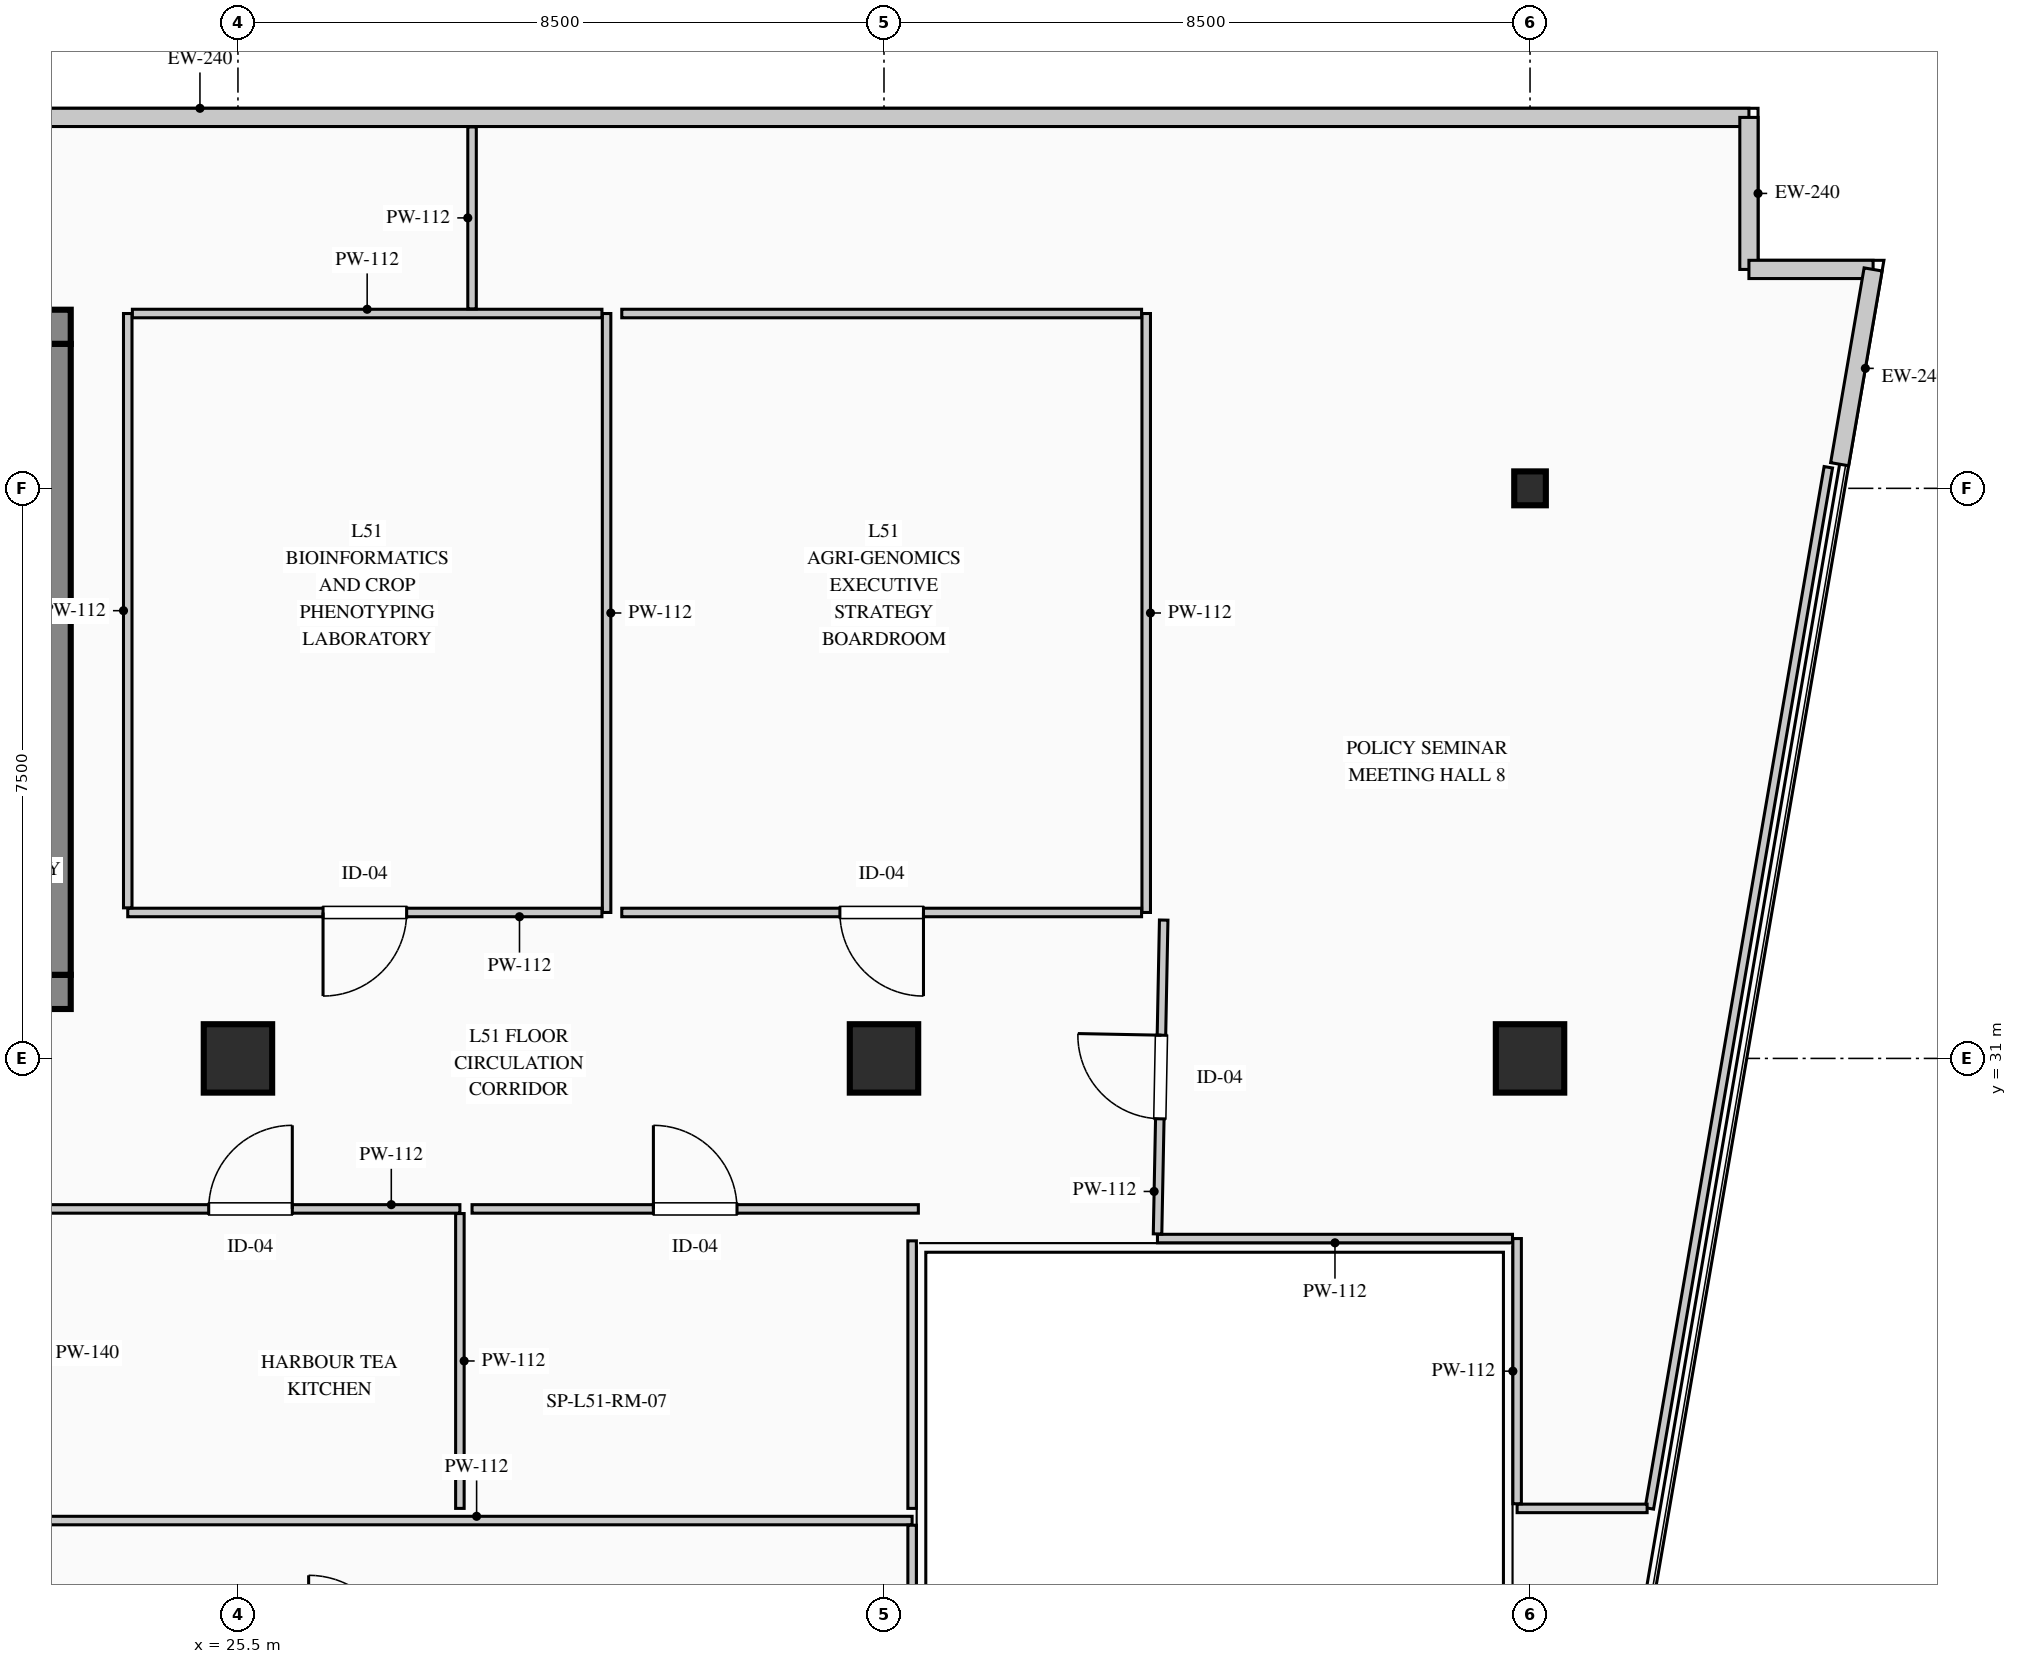
"""IFC4 building model, lengths in metres.
Left out: names, types, materials, properties, quantities, classifications, styles, units other than length and angle.
Written with IfcOpenShell. Run it as: python <this file> out.ifc"""

import sys

from ifc_helpers import new_model, si_unit, direction, frame, frame_2d, origin, origin_2d, place, context, subcontext, project, spatial, rectangle, i_section, extrude, element, fill, save


model = new_model("IFC4")
c1 = context("Model", 3, precision=1e-05, world=origin(), true_north=direction((0.0, 1.0)))
c2 = subcontext(c1, "Body", "Model", "MODEL_VIEW")
j1 = project(units=[si_unit("LENGTHUNIT", "METRE"), si_unit("PLANEANGLEUNIT", "RADIAN")], contexts=[c1])
p1 = place(None, origin())
s1 = spatial("IfcSite", under=j1, at=p1, CompositionType="ELEMENT")
p2 = place(p1, origin())
s2 = spatial("IfcBuilding", under=s1, at=p2, CompositionType="ELEMENT")
p3 = place(p2, frame((0.0, 0.0, 215.35)))
s3 = spatial("IfcBuildingStorey", under=s2, at=p3, CompositionType="ELEMENT", Elevation=215.35)
p4 = place(p3, frame((5.55, 40.625, 0.0), z_axis=(0.0, 0.0, 1.0), x_axis=(1.0, 0.0, 0.0)))
e1 = element("IfcWall", 1, at=p4, inside=s3, PredefinedType="SHEAR", context=c2, shape_type="SweptSolid", body=[
    extrude(rectangle(XDim=17.75, YDim=0.45, at=frame_2d((8.875, 0.0))), origin(), (0.0, 0.0, 1.0), 3.95),
])
p5 = place(p4, frame((15.895, 0.0, 0.0)))
e2 = element("IfcOpeningElement", 2, at=p5, cuts=e1, PredefinedType="OPENING", context=c2, shape_type="SweptSolid", body=[
    extrude(rectangle(XDim=1.18, YDim=2.25, at=frame_2d((0.59, 1.125))), frame((0.0, 0.235, 0.0), z_axis=(0.0, -1.0, 0.0), x_axis=(1.0, 0.0, 0.0)), (0.0, 0.0, 1.0), 0.47),
])
p6 = place(p3, frame((5.55, 31.875, 0.0), z_axis=(0.0, 0.0, 1.0), x_axis=(1.0, 0.0, 0.0)))
e3 = element("IfcWall", 3, at=p6, inside=s3, PredefinedType="SHEAR", context=c2, shape_type="SweptSolid", body=[
    extrude(rectangle(XDim=17.75, YDim=0.45, at=frame_2d((8.875, 0.0))), origin(), (0.0, 0.0, 1.0), 3.95),
])
p7 = place(p6, frame((3.1, 0.0, 0.0)))
e4 = element("IfcOpeningElement", 4, at=p7, cuts=e3, PredefinedType="OPENING", context=c2, shape_type="SweptSolid", body=[
    extrude(rectangle(XDim=1.2, YDim=2.2, at=frame_2d((0.6, 1.1))), frame((0.0, 0.235, 0.0), z_axis=(0.0, -1.0, 0.0), x_axis=(1.0, 0.0, 0.0)), (0.0, 0.0, 1.0), 0.47),
])
p8 = place(p6, frame((6.95, 0.0, 0.0)))
e5 = element("IfcOpeningElement", 5, at=p8, cuts=e3, PredefinedType="OPENING", context=c2, shape_type="SweptSolid", body=[
    extrude(rectangle(XDim=1.2, YDim=2.2, at=frame_2d((0.6, 1.1))), frame((0.0, 0.235, 0.0), z_axis=(0.0, -1.0, 0.0), x_axis=(1.0, 0.0, 0.0)), (0.0, 0.0, 1.0), 0.47),
])
p9 = place(p6, frame((8.8, 0.0, 0.0)))
e6 = element("IfcOpeningElement", 6, at=p9, cuts=e3, PredefinedType="OPENING", context=c2, shape_type="SweptSolid", body=[
    extrude(rectangle(XDim=1.15, YDim=2.2, at=frame_2d((0.575, 1.1))), frame((0.0, 0.235, 0.0), z_axis=(0.0, -1.0, 0.0), x_axis=(1.0, 0.0, 0.0)), (0.0, 0.0, 1.0), 0.47),
])
p10 = place(p6, frame((15.9, 0.0, 0.0)))
e7 = element("IfcOpeningElement", 7, at=p10, cuts=e3, PredefinedType="OPENING", context=c2, shape_type="SweptSolid", body=[
    extrude(rectangle(XDim=1.2, YDim=2.2, at=frame_2d((0.6, 1.1))), frame((0.0, 0.235, 0.0), z_axis=(0.0, -1.0, 0.0), x_axis=(1.0, 0.0, 0.0)), (0.0, 0.0, 1.0), 0.47),
])
p11 = place(p3, frame((23.075, 32.1, 0.0), z_axis=(0.0, 0.0, 1.0), x_axis=(0.0, 1.0, 0.0)))
e8 = element("IfcWall", 8, at=p11, inside=s3, PredefinedType="SHEAR", context=c2, shape_type="SweptSolid", body=[
    extrude(rectangle(XDim=8.3, YDim=0.45, at=frame_2d((4.15, 0.0))), origin(), (0.0, 0.0, 1.0), 3.95),
])
for number, where, z_axis, x_axis in (
    (9, (25.5, 31.0, 0.0), (0.0, 0.0, 1.0), (1.0, 0.0, 0.0)),
    (10, (34.0, 31.0, 0.0), (0.0, 0.0, 1.0), (1.0, 0.0, 0.0)),
    (11, (42.5, 31.0, 0.0), (0.0, 0.0, 1.0), (1.0, 0.0, 0.0)),
):
    element("IfcColumn", number, at=place(p3, frame(where, z_axis=z_axis, x_axis=x_axis)), inside=s3, PredefinedType="COLUMN", context=c2, shape_type="SweptSolid", body=[
        extrude(rectangle(XDim=0.9, YDim=0.9, at=origin_2d()), origin(), (0.0, 0.0, 1.0), 3.95),
    ])
p12 = place(p3, frame((42.5, 38.5, 0.0), z_axis=(0.0, 0.0, 1.0), x_axis=(1.0, 0.0, 0.0)))
e12 = element("IfcColumn", 12, at=p12, inside=s3, PredefinedType="COLUMN", context=c2, shape_type="SweptSolid", body=[
    extrude(i_section(OverallWidth=0.416, OverallDepth=0.446, WebThickness=0.039, FlangeThickness=0.063, FilletRadius=0.015, at=origin_2d()), origin(), (0.0, 0.0, 1.0), 3.95),
])
p13 = place(p3, frame((4.62, 43.38, 0.0), z_axis=(0.0, 0.0, 1.0), x_axis=(1.0, 0.0, 0.0)))
e13 = element("IfcWall", 13, at=p13, inside=s3, PredefinedType="STANDARD", context=c2, shape_type="SweptSolid", body=[
    extrude(rectangle(XDim=40.76, YDim=0.24, at=frame_2d((20.38, 0.0))), origin(), (0.0, 0.0, 1.0), 3.7),
])
p14 = place(p13, frame((13.324, 0.0, 0.9)))
e14 = element("IfcOpeningElement", 14, at=p14, cuts=e13, PredefinedType="OPENING", context=c2, shape_type="SweptSolid", body=[
    extrude(rectangle(XDim=2.7, YDim=2.1, at=frame_2d((1.35, 1.05))), frame((0.0, 0.13, 0.0), z_axis=(0.0, -1.0, 0.0), x_axis=(1.0, 0.0, 0.0)), (0.0, 0.0, 1.0), 0.26),
])
p15 = place(p3, frame((45.38, 43.38, 0.0), z_axis=(0.0, 0.0, 1.0), x_axis=(0.0, -1.0, 0.0)))
e15 = element("IfcWall", 15, at=p15, inside=s3, PredefinedType="STANDARD", context=c2, shape_type="SweptSolid", body=[
    extrude(rectangle(XDim=2.0, YDim=0.24, at=frame_2d((1.0, 0.0))), origin(), (0.0, 0.0, 1.0), 3.7),
])
p16 = place(p3, frame((45.38, 41.38, 0.0), z_axis=(0.0, 0.0, 1.0), x_axis=(1.0, 0.0, 0.0)))
e16 = element("IfcWall", 16, at=p16, inside=s3, PredefinedType="STANDARD", context=c2, shape_type="SweptSolid", body=[
    extrude(rectangle(XDim=1.634, YDim=0.24, at=frame_2d((0.817, 0.0))), origin(), (0.0, 0.0, 1.0), 3.7),
])
p17 = place(p3, frame((47.014, 41.38, 0.0), z_axis=(0.0, 0.0, 1.0), x_axis=(-0.169406892601, -0.985546196147, 0.0)))
e17 = element("IfcWall", 17, at=p17, inside=s3, PredefinedType="STANDARD", context=c2, shape_type="SweptSolid", body=[
    extrude(rectangle(XDim=2.6, YDim=0.24, at=frame_2d((1.3, 0.0))), origin(), (0.0, 0.0, 1.0), 3.7),
])
p18 = place(p3, frame((30.35, 40.8, 0.0), z_axis=(0.0, 0.0, 1.0), x_axis=(0.0, -1.0, 0.0)))
e18 = element("IfcWall", 18, at=p18, inside=s3, PredefinedType="PARTITIONING", context=c2, shape_type="SweptSolid", body=[
    extrude(rectangle(XDim=7.88, YDim=0.112, at=frame_2d((3.94, 0.0))), origin(), (0.0, 0.0, 1.0), 3.7),
])
p19 = place(p3, frame((30.289, 32.92, 0.0), z_axis=(0.0, 0.0, 1.0), x_axis=(-1.0, 0.0, 0.0)))
e19 = element("IfcWall", 19, at=p19, inside=s3, PredefinedType="PARTITIONING", context=c2, shape_type="SweptSolid", body=[
    extrude(rectangle(XDim=6.239, YDim=0.112, at=frame_2d((3.12, 0.0))), origin(), (0.0, 0.0, 1.0), 3.7),
])
p20 = place(p19, frame((2.57, 0.0, 0.0)))
e20 = element("IfcOpeningElement", 20, at=p20, cuts=e19, PredefinedType="OPENING", context=c2, shape_type="SweptSolid", body=[
    extrude(rectangle(XDim=1.1, YDim=2.2, at=frame_2d((0.55, 1.1))), frame((0.0, 0.066, 0.0), z_axis=(0.0, -1.0, 0.0), x_axis=(1.0, 0.0, 0.0)), (0.0, 0.0, 1.0), 0.132),
])
p21 = place(p3, frame((24.05, 32.981, 0.0), z_axis=(0.0, 0.0, 1.0), x_axis=(0.0, 1.0, 0.0)))
e21 = element("IfcWall", 21, at=p21, inside=s3, PredefinedType="PARTITIONING", context=c2, shape_type="SweptSolid", body=[
    extrude(rectangle(XDim=7.819, YDim=0.112, at=frame_2d((3.91, 0.0))), origin(), (0.0, 0.0, 1.0), 3.7),
])
p22 = place(p3, frame((24.111, 40.8, 0.0), z_axis=(0.0, 0.0, 1.0), x_axis=(1.0, 0.0, 0.0)))
e22 = element("IfcWall", 22, at=p22, inside=s3, PredefinedType="PARTITIONING", context=c2, shape_type="SweptSolid", body=[
    extrude(rectangle(XDim=6.178, YDim=0.112, at=frame_2d((3.089, 0.0))), origin(), (0.0, 0.0, 1.0), 3.7),
])
p23 = place(p3, frame((37.45, 40.8, 0.0), z_axis=(0.0, 0.0, 1.0), x_axis=(0.0, -1.0, 0.0)))
e23 = element("IfcWall", 23, at=p23, inside=s3, PredefinedType="PARTITIONING", context=c2, shape_type="SweptSolid", body=[
    extrude(rectangle(XDim=7.88, YDim=0.112, at=frame_2d((3.94, 0.0))), origin(), (0.0, 0.0, 1.0), 3.7),
])
p24 = place(p3, frame((37.389, 32.92, 0.0), z_axis=(0.0, 0.0, 1.0), x_axis=(-1.0, 0.0, 0.0)))
e24 = element("IfcWall", 24, at=p24, inside=s3, PredefinedType="PARTITIONING", context=c2, shape_type="SweptSolid", body=[
    extrude(rectangle(XDim=6.839, YDim=0.112, at=frame_2d((3.419, 0.0))), origin(), (0.0, 0.0, 1.0), 3.7),
])
p25 = place(p24, frame((2.869, 0.0, 0.0)))
e25 = element("IfcOpeningElement", 25, at=p25, cuts=e24, PredefinedType="OPENING", context=c2, shape_type="SweptSolid", body=[
    extrude(rectangle(XDim=1.1, YDim=2.2, at=frame_2d((0.55, 1.1))), frame((0.0, 0.066, 0.0), z_axis=(0.0, -1.0, 0.0), x_axis=(1.0, 0.0, 0.0)), (0.0, 0.0, 1.0), 0.132),
])
p26 = place(p3, frame((30.55, 40.8, 0.0), z_axis=(0.0, 0.0, 1.0), x_axis=(1.0, 0.0, 0.0)))
e26 = element("IfcWall", 26, at=p26, inside=s3, PredefinedType="PARTITIONING", context=c2, shape_type="SweptSolid", body=[
    extrude(rectangle(XDim=6.839, YDim=0.112, at=frame_2d((3.419, 0.0))), origin(), (0.0, 0.0, 1.0), 3.7),
])
p27 = place(p3, frame((22.91, 24.92, 0.0), z_axis=(0.0, 0.0, 1.0), x_axis=(1.0, 0.0, 0.0)))
e27 = element("IfcWall", 27, at=p27, inside=s3, PredefinedType="PARTITIONING", context=c2, shape_type="SweptSolid", body=[
    extrude(rectangle(XDim=11.46, YDim=0.112, at=frame_2d((5.73, 0.0))), origin(), (0.0, 0.0, 1.0), 3.325),
])
p28 = place(p3, frame((34.37, 24.859, 0.0), z_axis=(0.0, 0.0, 1.0), x_axis=(0.0, -1.0, 0.0)))
e28 = element("IfcWall", 28, at=p28, inside=s3, PredefinedType="PARTITIONING", context=c2, shape_type="SweptSolid", body=[
    extrude(rectangle(XDim=5.239, YDim=0.112, at=frame_2d((2.619, 0.0))), origin(), (0.0, 0.0, 1.0), 3.7),
])
p29 = place(p3, frame((22.91, 29.02, 0.0), z_axis=(0.0, 0.0, 1.0), x_axis=(1.0, 0.0, 0.0)))
e29 = element("IfcWall", 29, at=p29, inside=s3, PredefinedType="PARTITIONING", context=c2, shape_type="SweptSolid", body=[
    extrude(rectangle(XDim=5.51, YDim=0.112, at=frame_2d((2.755, 0.0))), origin(), (0.0, 0.0, 1.0), 3.485),
])
p30 = place(p29, frame((2.205, 0.0, 0.0)))
e30 = element("IfcOpeningElement", 30, at=p30, cuts=e29, PredefinedType="OPENING", context=c2, shape_type="SweptSolid", body=[
    extrude(rectangle(XDim=1.1, YDim=2.2, at=frame_2d((0.55, 1.1))), frame((0.0, 0.066, 0.0), z_axis=(0.0, -1.0, 0.0), x_axis=(1.0, 0.0, 0.0)), (0.0, 0.0, 1.0), 0.132),
])
p31 = place(p3, frame((28.42, 28.959, 0.0), z_axis=(0.0, 0.0, 1.0), x_axis=(0.0, -1.0, 0.0)))
e31 = element("IfcWall", 31, at=p31, inside=s3, PredefinedType="PARTITIONING", context=c2, shape_type="SweptSolid", body=[
    extrude(rectangle(XDim=3.879, YDim=0.112, at=frame_2d((1.939, 0.0))), origin(), (0.0, 0.0, 1.0), 3.7),
])
p32 = place(p3, frame((34.37, 28.6, 0.0), z_axis=(0.0, 0.0, 1.0), x_axis=(0.0, -1.0, 0.0)))
e32 = element("IfcWall", 32, at=p32, inside=s3, PredefinedType="PARTITIONING", context=c2, shape_type="SweptSolid", body=[
    extrude(rectangle(XDim=3.52, YDim=0.112, at=frame_2d((1.76, 0.0))), origin(), (0.0, 0.0, 1.0), 3.7),
])
p33 = place(p3, frame((28.58, 29.02, 0.0), z_axis=(0.0, 0.0, 1.0), x_axis=(1.0, 0.0, 0.0)))
e33 = element("IfcWall", 33, at=p33, inside=s3, PredefinedType="PARTITIONING", context=c2, shape_type="SweptSolid", body=[
    extrude(rectangle(XDim=5.872, YDim=0.112, at=frame_2d((2.936, 0.0))), origin(), (0.0, 0.0, 1.0), 3.485),
])
p34 = place(p33, frame((2.386, 0.0, 0.0)))
e34 = element("IfcOpeningElement", 34, at=p34, cuts=e33, PredefinedType="OPENING", context=c2, shape_type="SweptSolid", body=[
    extrude(rectangle(XDim=1.1, YDim=2.2, at=frame_2d((0.55, 1.1))), frame((0.0, 0.066, 0.0), z_axis=(0.0, -1.0, 0.0), x_axis=(1.0, 0.0, 0.0)), (0.0, 0.0, 1.0), 0.132),
])
p35 = place(p3, frame((46.425, 38.777, 0.0), z_axis=(0.0, 0.0, 1.0), x_axis=(-0.169413343695, -0.985545087238, 0.0)))
e35 = element("IfcWall", 35, at=p35, inside=s3, PredefinedType="PARTITIONING", context=c2, shape_type="SweptSolid", body=[
    extrude(rectangle(XDim=13.898, YDim=0.112, at=frame_2d((6.949, 0.0))), origin(), (0.0, 0.0, 1.0), 3.7),
])
p36 = place(p3, frame((44.041, 25.08, 0.0), z_axis=(0.0, 0.0, 1.0), x_axis=(-1.0, 0.0, 0.0)))
e36 = element("IfcWall", 36, at=p36, inside=s3, PredefinedType="PARTITIONING", context=c2, shape_type="SweptSolid", body=[
    extrude(rectangle(XDim=1.71, YDim=0.112, at=frame_2d((0.855, 0.0))), origin(), (0.0, 0.0, 1.0), 3.7),
])
p37 = place(p3, frame((42.33, 25.141, 0.0), z_axis=(0.0, 0.0, 1.0), x_axis=(0.0, 1.0, 0.0)))
e37 = element("IfcWall", 37, at=p37, inside=s3, PredefinedType="PARTITIONING", context=c2, shape_type="SweptSolid", body=[
    extrude(rectangle(XDim=3.489, YDim=0.112, at=frame_2d((1.744, 0.0))), origin(), (0.0, 0.0, 1.0), 3.7),
])
p38 = place(p3, frame((42.269, 28.63, 0.0), z_axis=(0.0, 0.0, 1.0), x_axis=(-1.0, 0.0, 0.0)))
e38 = element("IfcWall", 38, at=p38, inside=s3, PredefinedType="PARTITIONING", context=c2, shape_type="SweptSolid", body=[
    extrude(rectangle(XDim=4.671, YDim=0.112, at=frame_2d((2.335, 0.0))), origin(), (0.0, 0.0, 1.0), 3.7),
])
p39 = place(p3, frame((37.599, 28.691, 0.0), z_axis=(0.0, 0.0, 1.0), x_axis=(0.019566997539, 0.999808547977, 0.0)))
e39 = element("IfcWall", 39, at=p39, inside=s3, PredefinedType="PARTITIONING", context=c2, shape_type="SweptSolid", body=[
    extrude(rectangle(XDim=4.13, YDim=0.112, at=frame_2d((2.065, 0.0))), origin(), (0.0, 0.0, 1.0), 3.7),
])
p40 = place(p39, frame((1.515, 0.0, 0.0)))
e40 = element("IfcOpeningElement", 40, at=p40, cuts=e39, PredefinedType="OPENING", context=c2, shape_type="SweptSolid", body=[
    extrude(rectangle(XDim=1.1, YDim=2.2, at=frame_2d((0.55, 1.1))), frame((0.0, 0.066, 0.0), z_axis=(0.0, -1.0, 0.0), x_axis=(1.0, 0.0, 0.0)), (0.0, 0.0, 1.0), 0.132),
])
p41 = place(p3, frame((28.58, 40.861, 0.0), z_axis=(0.0, 0.0, 1.0), x_axis=(0.0, 1.0, 0.0)))
e41 = element("IfcWall", 41, at=p41, inside=s3, PredefinedType="PARTITIONING", context=c2, shape_type="SweptSolid", body=[
    extrude(rectangle(XDim=2.394, YDim=0.112, at=frame_2d((1.197, 0.0))), origin(), (0.0, 0.0, 1.0), 3.7),
])
p42 = place(p20, origin())
e42 = element("IfcDoor", 42, at=p42, inside=s3, OperationType="SINGLE_SWING_RIGHT", PredefinedType="DOOR", context=c2, shape_type="SweptSolid", body=[
    extrude(rectangle(XDim=1.1, YDim=2.2, at=frame_2d((0.55, 1.1))), frame((0.0, 0.025, 0.0), z_axis=(0.0, -1.0, 0.0), x_axis=(1.0, 0.0, 0.0)), (0.0, 0.0, 1.0), 0.05),
])
fill(e20, e42)
p43 = place(p25, origin())
e43 = element("IfcDoor", 43, at=p43, inside=s3, OperationType="SINGLE_SWING_LEFT", PredefinedType="DOOR", context=c2, shape_type="SweptSolid", body=[
    extrude(rectangle(XDim=1.1, YDim=2.2, at=frame_2d((0.55, 1.1))), frame((0.0, 0.025, 0.0), z_axis=(0.0, -1.0, 0.0), x_axis=(1.0, 0.0, 0.0)), (0.0, 0.0, 1.0), 0.05),
])
fill(e25, e43)
p44 = place(p30, origin())
e44 = element("IfcDoor", 44, at=p44, inside=s3, OperationType="SINGLE_SWING_RIGHT", PredefinedType="DOOR", context=c2, shape_type="SweptSolid", body=[
    extrude(rectangle(XDim=1.1, YDim=2.2, at=frame_2d((0.55, 1.1))), frame((0.0, 0.025, 0.0), z_axis=(0.0, -1.0, 0.0), x_axis=(1.0, 0.0, 0.0)), (0.0, 0.0, 1.0), 0.05),
])
fill(e30, e44)
p45 = place(p34, origin())
e45 = element("IfcDoor", 45, at=p45, inside=s3, OperationType="SINGLE_SWING_LEFT", PredefinedType="DOOR", context=c2, shape_type="SweptSolid", body=[
    extrude(rectangle(XDim=1.1, YDim=2.2, at=frame_2d((0.55, 1.1))), frame((0.0, 0.025, 0.0), z_axis=(0.0, -1.0, 0.0), x_axis=(1.0, 0.0, 0.0)), (0.0, 0.0, 1.0), 0.05),
])
fill(e34, e45)
p46 = place(p40, origin())
e46 = element("IfcDoor", 46, at=p46, inside=s3, OperationType="SINGLE_SWING_RIGHT", PredefinedType="DOOR", context=c2, shape_type="SweptSolid", body=[
    extrude(rectangle(XDim=1.1, YDim=2.2, at=frame_2d((0.55, 1.1))), frame((0.0, 0.025, 0.0), z_axis=(0.0, -1.0, 0.0), x_axis=(1.0, 0.0, 0.0)), (0.0, 0.0, 1.0), 0.05),
])
fill(e40, e46)
save(model, sys.argv[1])
